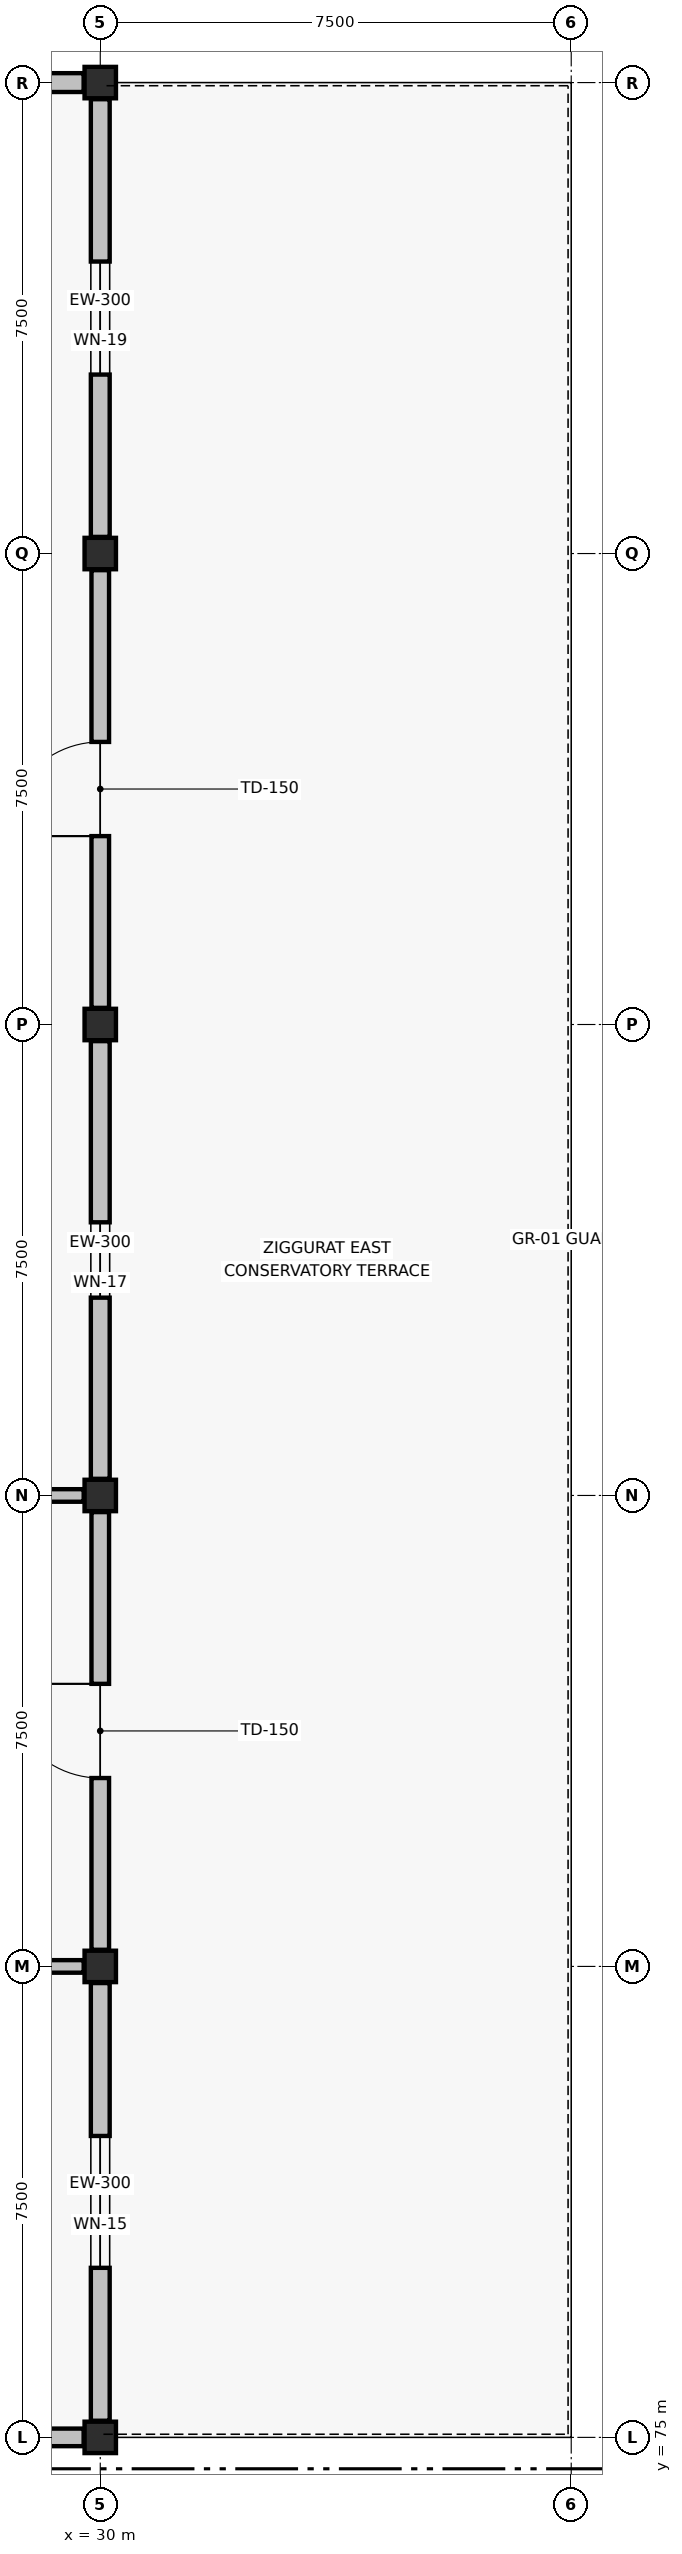
"""IFC4 building model, lengths in metres.
Left out: names, types, materials, properties, quantities, classifications, styles, units other than length and angle.
Written with IfcOpenShell. Run it as: python <this file> out.ifc"""

import sys

from ifc_helpers import new_model, si_unit, direction, frame, frame_2d, origin, origin_2d, place, context, subcontext, project, spatial, rectangle, extrude, element, fill, save


model = new_model("IFC4")
c1 = context("Model", 3, precision=1e-05, world=origin(), true_north=direction((0.0, 1.0)))
c2 = subcontext(c1, "Body", "Model", "MODEL_VIEW")
j1 = project(units=[si_unit("LENGTHUNIT", "METRE"), si_unit("PLANEANGLEUNIT", "RADIAN")], contexts=[c1])
p1 = place(None, origin())
s1 = spatial("IfcSite", under=j1, at=p1, CompositionType="ELEMENT")
p2 = place(p1, origin())
s2 = spatial("IfcBuilding", under=s1, at=p2, CompositionType="ELEMENT")
p3 = place(p2, frame((0.0, 0.0, 17.1)))
s3 = spatial("IfcBuildingStorey", under=s2, at=p3, CompositionType="ELEMENT", Elevation=17.1)
for number, where, z_axis, x_axis in (
    (1, (30.0, 75.0, 0.0), (0.0, 0.0, 1.0), (1.0, 0.0, 0.0)),
    (2, (30.0, 82.5, 0.0), (0.0, 0.0, 1.0), (1.0, 0.0, 0.0)),
    (3, (30.0, 90.0, 0.0), (0.0, 0.0, 1.0), (1.0, 0.0, 0.0)),
    (4, (30.0, 97.5, 0.0), (0.0, 0.0, 1.0), (1.0, 0.0, 0.0)),
    (5, (30.0, 105.0, 0.0), (0.0, 0.0, 1.0), (1.0, 0.0, 0.0)),
    (6, (30.0, 112.5, 0.0), (0.0, 0.0, 1.0), (1.0, 0.0, 0.0)),
):
    element("IfcColumn", number, at=place(p3, frame(where, z_axis=z_axis, x_axis=x_axis)), inside=s3, PredefinedType="COLUMN", context=c2, shape_type="SweptSolid", body=[
        extrude(rectangle(XDim=0.5, YDim=0.5, at=origin_2d()), origin(), (0.0, 0.0, 1.0), 3.9),
    ])
p4 = place(p3, frame((22.765, 112.5, 0.0), z_axis=(0.0, 0.0, 1.0), x_axis=(1.0, 0.0, 0.0)))
e7 = element("IfcWall", 7, at=p4, inside=s3, PredefinedType="SOLIDWALL", context=c2, shape_type="SweptSolid", body=[
    extrude(rectangle(XDim=6.97, YDim=0.3, at=frame_2d((3.485, 0.0))), origin(), (0.0, 0.0, 1.0), 2.84),
])
p5 = place(p4, frame((2.685, 0.0, 0.6)))
e8 = element("IfcOpeningElement", 8, at=p5, cuts=e7, PredefinedType="OPENING", context=c2, shape_type="SweptSolid", body=[
    extrude(rectangle(XDim=1.6, YDim=1.3, at=frame_2d((0.8, 0.65))), frame((0.0, 0.16, 0.0), z_axis=(0.0, -1.0, 0.0), x_axis=(1.0, 0.0, 0.0)), (0.0, 0.0, 1.0), 0.32),
])
p6 = place(p3, frame((22.765, 75.0, 0.0), z_axis=(0.0, 0.0, 1.0), x_axis=(1.0, 0.0, 0.0)))
e9 = element("IfcWall", 9, at=p6, inside=s3, PredefinedType="SOLIDWALL", context=c2, shape_type="SweptSolid", body=[
    extrude(rectangle(XDim=6.97, YDim=0.28, at=frame_2d((3.485, 0.0))), origin(), (0.0, 0.0, 1.0), 2.84),
])
p7 = place(p6, frame((2.41, 0.0, 0.6)))
e10 = element("IfcOpeningElement", 10, at=p7, cuts=e9, PredefinedType="OPENING", context=c2, shape_type="SweptSolid", body=[
    extrude(rectangle(XDim=2.15, YDim=1.45, at=frame_2d((1.075, 0.725))), frame((0.0, 0.15, 0.0), z_axis=(0.0, -1.0, 0.0), x_axis=(1.0, 0.0, 0.0)), (0.0, 0.0, 1.0), 0.3),
])
p8 = place(p3, frame((30.0, 75.265, 0.0), z_axis=(0.0, 0.0, 1.0), x_axis=(0.0, 1.0, 0.0)))
e11 = element("IfcWall", 11, at=p8, inside=s3, PredefinedType="SOLIDWALL", context=c2, shape_type="SweptSolid", body=[
    extrude(rectangle(XDim=6.97, YDim=0.3, at=frame_2d((3.485, 0.0))), origin(), (0.0, 0.0, 1.0), 2.74),
])
p9 = place(p8, frame((2.435, 0.0, 0.6)))
e12 = element("IfcOpeningElement", 12, at=p9, cuts=e11, PredefinedType="OPENING", context=c2, shape_type="SweptSolid", body=[
    extrude(rectangle(XDim=2.1, YDim=1.3, at=frame_2d((1.05, 0.65))), frame((0.0, 0.16, 0.0), z_axis=(0.0, -1.0, 0.0), x_axis=(1.0, 0.0, 0.0)), (0.0, 0.0, 1.0), 0.32),
])
p10 = place(p3, frame((30.0, 82.765, 0.0), z_axis=(0.0, 0.0, 1.0), x_axis=(0.0, 1.0, 0.0)))
e13 = element("IfcWall", 13, at=p10, inside=s3, PredefinedType="SOLIDWALL", context=c2, shape_type="SweptSolid", body=[
    extrude(rectangle(XDim=6.97, YDim=0.28, at=frame_2d((3.485, 0.0))), origin(), (0.0, 0.0, 1.0), 2.69),
])
p11 = place(p10, frame((2.735, 0.0, 0.0)))
e14 = element("IfcOpeningElement", 14, at=p11, cuts=e13, PredefinedType="OPENING", context=c2, shape_type="SweptSolid", body=[
    extrude(rectangle(XDim=1.5, YDim=2.15, at=frame_2d((0.75, 1.075))), frame((0.0, 0.15, 0.0), z_axis=(0.0, -1.0, 0.0), x_axis=(1.0, 0.0, 0.0)), (0.0, 0.0, 1.0), 0.3),
])
p12 = place(p3, frame((30.0, 90.265, 0.0), z_axis=(0.0, 0.0, 1.0), x_axis=(0.0, 1.0, 0.0)))
e15 = element("IfcWall", 15, at=p12, inside=s3, PredefinedType="SOLIDWALL", context=c2, shape_type="SweptSolid", body=[
    extrude(rectangle(XDim=6.97, YDim=0.3, at=frame_2d((3.485, 0.0))), origin(), (0.0, 0.0, 1.0), 2.64),
])
p13 = place(p12, frame((2.885, 0.0, 0.6)))
e16 = element("IfcOpeningElement", 16, at=p13, cuts=e15, PredefinedType="OPENING", context=c2, shape_type="SweptSolid", body=[
    extrude(rectangle(XDim=1.2, YDim=1.2, at=frame_2d((0.6, 0.6))), frame((0.0, 0.16, 0.0), z_axis=(0.0, -1.0, 0.0), x_axis=(1.0, 0.0, 0.0)), (0.0, 0.0, 1.0), 0.32),
])
p14 = place(p3, frame((30.0, 97.765, 0.0), z_axis=(0.0, 0.0, 1.0), x_axis=(0.0, 1.0, 0.0)))
e17 = element("IfcWall", 17, at=p14, inside=s3, PredefinedType="SOLIDWALL", context=c2, shape_type="SweptSolid", body=[
    extrude(rectangle(XDim=6.97, YDim=0.28, at=frame_2d((3.485, 0.0))), origin(), (0.0, 0.0, 1.0), 2.64),
])
p15 = place(p14, frame((2.735, 0.0, 0.0)))
e18 = element("IfcOpeningElement", 18, at=p15, cuts=e17, PredefinedType="OPENING", context=c2, shape_type="SweptSolid", body=[
    extrude(rectangle(XDim=1.5, YDim=2.15, at=frame_2d((0.75, 1.075))), frame((0.0, 0.15, 0.0), z_axis=(0.0, -1.0, 0.0), x_axis=(1.0, 0.0, 0.0)), (0.0, 0.0, 1.0), 0.3),
])
p16 = place(p3, frame((30.0, 105.265, 0.0), z_axis=(0.0, 0.0, 1.0), x_axis=(0.0, 1.0, 0.0)))
e19 = element("IfcWall", 19, at=p16, inside=s3, PredefinedType="SOLIDWALL", context=c2, shape_type="SweptSolid", body=[
    extrude(rectangle(XDim=6.97, YDim=0.3, at=frame_2d((3.485, 0.0))), origin(), (0.0, 0.0, 1.0), 2.79),
])
p17 = place(p16, frame((2.585, 0.0, 0.6)))
e20 = element("IfcOpeningElement", 20, at=p17, cuts=e19, PredefinedType="OPENING", context=c2, shape_type="SweptSolid", body=[
    extrude(rectangle(XDim=1.8, YDim=1.2, at=frame_2d((0.9, 0.6))), frame((0.0, 0.16, 0.0), z_axis=(0.0, -1.0, 0.0), x_axis=(1.0, 0.0, 0.0)), (0.0, 0.0, 1.0), 0.32),
])
p18 = place(p3, frame((22.764, 82.5, 0.0), z_axis=(0.0, 0.0, 1.0), x_axis=(1.0, 0.0, 0.0)))
e21 = element("IfcWall", 21, at=p18, inside=s3, PredefinedType="PARTITIONING", context=c2, shape_type="SweptSolid", body=[
    extrude(rectangle(XDim=6.972, YDim=0.2, at=frame_2d((3.486, 0.0))), origin(), (0.0, 0.0, 1.0), 2.54),
])
p19 = place(p3, frame((22.764, 90.0, 0.0), z_axis=(0.0, 0.0, 1.0), x_axis=(1.0, 0.0, 0.0)))
e22 = element("IfcWall", 22, at=p19, inside=s3, PredefinedType="PARTITIONING", context=c2, shape_type="SweptSolid", body=[
    extrude(rectangle(XDim=6.972, YDim=0.2, at=frame_2d((3.486, 0.0))), origin(), (0.0, 0.0, 1.0), 2.69),
])
p20 = place(p9, origin())
e23 = element("IfcWindow", 23, at=p20, inside=s3, PartitioningType="SINGLE_PANEL", PredefinedType="WINDOW", context=c2, shape_type="SweptSolid", body=[
    extrude(rectangle(XDim=2.1, YDim=1.3, at=frame_2d((1.05, 0.65))), frame((0.0, 0.03, 0.0), z_axis=(0.0, -1.0, 0.0), x_axis=(1.0, 0.0, 0.0)), (0.0, 0.0, 1.0), 0.06),
])
fill(e12, e23)
p21 = place(p11, frame((1.5, 0.0, 0.0), z_axis=(0.0, 0.0, 1.0), x_axis=(-1.0, 0.0, 0.0)))
e24 = element("IfcDoor", 24, at=p21, inside=s3, OperationType="SINGLE_SWING_LEFT", PredefinedType="DOOR", context=c2, shape_type="SweptSolid", body=[
    extrude(rectangle(XDim=1.5, YDim=2.15, at=frame_2d((0.75, 1.075))), frame((0.0, 0.025, 0.0), z_axis=(0.0, -1.0, 0.0), x_axis=(1.0, 0.0, 0.0)), (0.0, 0.0, 1.0), 0.05),
])
fill(e14, e24)
p22 = place(p13, origin())
e25 = element("IfcWindow", 25, at=p22, inside=s3, PartitioningType="SINGLE_PANEL", PredefinedType="WINDOW", context=c2, shape_type="SweptSolid", body=[
    extrude(rectangle(XDim=1.2, YDim=1.2, at=frame_2d((0.6, 0.6))), frame((0.0, 0.03, 0.0), z_axis=(0.0, -1.0, 0.0), x_axis=(1.0, 0.0, 0.0)), (0.0, 0.0, 1.0), 0.06),
])
fill(e16, e25)
p23 = place(p15, frame((1.5, 0.0, 0.0), z_axis=(0.0, 0.0, 1.0), x_axis=(-1.0, 0.0, 0.0)))
e26 = element("IfcDoor", 26, at=p23, inside=s3, OperationType="SINGLE_SWING_RIGHT", PredefinedType="DOOR", context=c2, shape_type="SweptSolid", body=[
    extrude(rectangle(XDim=1.5, YDim=2.15, at=frame_2d((0.75, 1.075))), frame((0.0, 0.025, 0.0), z_axis=(0.0, -1.0, 0.0), x_axis=(1.0, 0.0, 0.0)), (0.0, 0.0, 1.0), 0.05),
])
fill(e18, e26)
p24 = place(p17, origin())
e27 = element("IfcWindow", 27, at=p24, inside=s3, PartitioningType="SINGLE_PANEL", PredefinedType="WINDOW", context=c2, shape_type="SweptSolid", body=[
    extrude(rectangle(XDim=1.8, YDim=1.2, at=frame_2d((0.9, 0.6))), frame((0.0, 0.03, 0.0), z_axis=(0.0, -1.0, 0.0), x_axis=(1.0, 0.0, 0.0)), (0.0, 0.0, 1.0), 0.06),
])
fill(e20, e27)
save(model, sys.argv[1])
